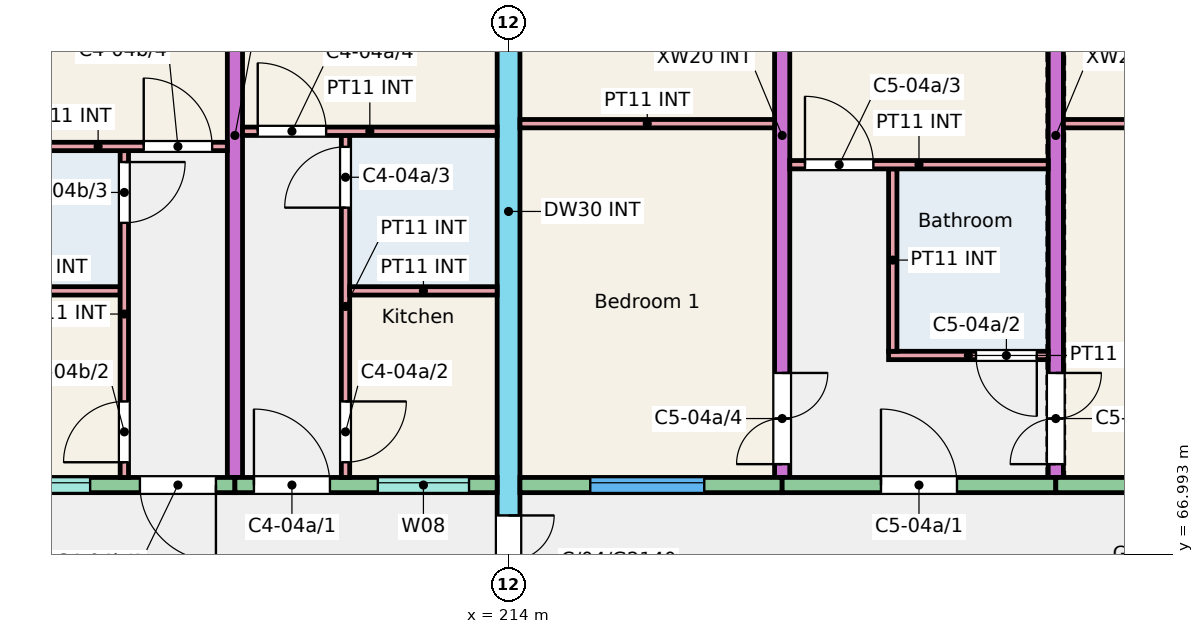
"""IFC4 building model, lengths in metres.
Left out: names, types, materials, properties, quantities, classifications, styles, units other than length and angle.
Written with IfcOpenShell. Run it as: python <this file> out.ifc"""

import sys

from ifc_helpers import new_model, si_unit, direction, frame, frame_2d, origin, place, context, subcontext, project, spatial, rectangle, extrude, element, fill, save


model = new_model("IFC4")
c1 = context("Model", 3, precision=1e-05, world=origin(), true_north=direction((0.0, 1.0)))
c2 = subcontext(c1, "Body", "Model", "MODEL_VIEW")
j1 = project(units=[si_unit("LENGTHUNIT", "METRE"), si_unit("PLANEANGLEUNIT", "RADIAN")], contexts=[c1])
p1 = place(None, origin())
s1 = spatial("IfcSite", under=j1, at=p1, CompositionType="ELEMENT")
p2 = place(p1, origin())
s2 = spatial("IfcBuilding", under=s1, at=p2, CompositionType="ELEMENT")
p3 = place(p2, frame((0.0, 0.0, 12.0)))
s3 = spatial("IfcBuildingStorey", under=s2, at=p3, CompositionType="ELEMENT", Elevation=12.0)
p4 = place(p3, frame((210.4, 68.0, 0.0), z_axis=(0.0, 0.0, 1.0), x_axis=(0.0, 1.0, 0.0)))
e1 = element("IfcWall", 1, at=p4, inside=s3, PredefinedType="SHEAR", context=c2, shape_type="SweptSolid", body=[
    extrude(rectangle(XDim=9.0, YDim=0.2, at=frame_2d((4.5, 0.0))), origin(), (0.0, 0.0, 1.0), 3.0),
])
p5 = place(p3, frame((214.0, 66.0, 0.0), z_axis=(0.0, 0.0, 1.0), x_axis=(0.0, 1.0, 0.0)))
e2 = element("IfcWall", 2, at=p5, inside=s3, PredefinedType="SHEAR", context=c2, shape_type="SweptSolid", body=[
    extrude(rectangle(XDim=11.0, YDim=0.3, at=frame_2d((5.5, 0.0))), origin(), (0.0, 0.0, 1.0), 3.0),
])
p6 = place(p5, frame((0.3, 0.0, 0.0)))
e3 = element("IfcOpeningElement", 3, at=p6, cuts=e2, PredefinedType="OPENING", context=c2, shape_type="SweptSolid", body=[
    extrude(rectangle(XDim=1.2, YDim=2.1, at=frame_2d((0.6, 1.05))), frame((0.0, 0.16, 0.0), z_axis=(0.0, -1.0, 0.0), x_axis=(1.0, 0.0, 0.0)), (0.0, 0.0, 1.0), 0.32),
])
p7 = place(p3, frame((217.6, 68.0, 0.0), z_axis=(0.0, 0.0, 1.0), x_axis=(0.0, 1.0, 0.0)))
e4 = element("IfcWall", 4, at=p7, inside=s3, PredefinedType="SHEAR", context=c2, shape_type="SweptSolid", body=[
    extrude(rectangle(XDim=9.0, YDim=0.2, at=frame_2d((4.5, 0.0))), origin(), (0.0, 0.0, 1.0), 3.0),
])
p8 = place(p7, frame((0.175, 0.0, 0.0)))
e5 = element("IfcOpeningElement", 5, at=p8, cuts=e4, PredefinedType="OPENING", context=c2, shape_type="SweptSolid", body=[
    extrude(rectangle(XDim=1.2, YDim=2.1, at=frame_2d((0.6, 1.05))), frame((0.0, 0.11, 0.0), z_axis=(0.0, -1.0, 0.0), x_axis=(1.0, 0.0, 0.0)), (0.0, 0.0, 1.0), 0.22),
])
p9 = place(p7, frame((6.4, 0.0, 0.0)))
e6 = element("IfcOpeningElement", 6, at=p9, cuts=e4, PredefinedType="OPENING", context=c2, shape_type="SweptSolid", body=[
    extrude(rectangle(XDim=1.2, YDim=2.1, at=frame_2d((0.6, 1.05))), frame((0.0, 0.11, 0.0), z_axis=(0.0, -1.0, 0.0), x_axis=(1.0, 0.0, 0.0)), (0.0, 0.0, 1.0), 0.22),
])
p10 = place(p3, frame((221.2, 68.0, 0.0), z_axis=(0.0, 0.0, 1.0), x_axis=(0.0, 1.0, 0.0)))
e7 = element("IfcWall", 7, at=p10, inside=s3, PredefinedType="SHEAR", context=c2, shape_type="SweptSolid", body=[
    extrude(rectangle(XDim=9.0, YDim=0.2, at=frame_2d((4.5, 0.0))), origin(), (0.0, 0.0, 1.0), 3.0),
])
p11 = place(p10, frame((0.175, 0.0, 0.0)))
e8 = element("IfcOpeningElement", 8, at=p11, cuts=e7, PredefinedType="OPENING", context=c2, shape_type="SweptSolid", body=[
    extrude(rectangle(XDim=1.2, YDim=2.1, at=frame_2d((0.6, 1.05))), frame((0.0, 0.11, 0.0), z_axis=(0.0, -1.0, 0.0), x_axis=(1.0, 0.0, 0.0)), (0.0, 0.0, 1.0), 0.22),
])
p12 = place(p10, frame((6.4, 0.0, 0.0)))
e9 = element("IfcOpeningElement", 9, at=p12, cuts=e7, PredefinedType="OPENING", context=c2, shape_type="SweptSolid", body=[
    extrude(rectangle(XDim=1.2, YDim=2.1, at=frame_2d((0.6, 1.05))), frame((0.0, 0.11, 0.0), z_axis=(0.0, -1.0, 0.0), x_axis=(1.0, 0.0, 0.0)), (0.0, 0.0, 1.0), 0.22),
])
p13 = place(p3, frame((206.8, 67.9, 0.0), z_axis=(0.0, 0.0, 1.0), x_axis=(1.0, 0.0, 0.0)))
e10 = element("IfcWall", 10, at=p13, inside=s3, PredefinedType="SOLIDWALL", context=c2, shape_type="SweptSolid", body=[
    extrude(rectangle(XDim=3.6, YDim=0.2, at=frame_2d((1.8, 0.0))), origin(), (0.0, 0.0, 1.0), 3.0),
])
p14 = place(p13, frame((0.495, 0.0, 1.1)))
e11 = element("IfcOpeningElement", 11, at=p14, cuts=e10, PredefinedType="OPENING", context=c2, shape_type="SweptSolid", body=[
    extrude(rectangle(XDim=1.2, YDim=1.3, at=frame_2d((0.6, 0.65))), frame((0.0, 0.11, 0.0), z_axis=(0.0, -1.0, 0.0), x_axis=(1.0, 0.0, 0.0)), (0.0, 0.0, 1.0), 0.22),
])
p15 = place(p13, frame((2.35, 0.0, 0.0)))
e12 = element("IfcOpeningElement", 12, at=p15, cuts=e10, PredefinedType="OPENING", context=c2, shape_type="SweptSolid", body=[
    extrude(rectangle(XDim=1.0, YDim=2.1, at=frame_2d((0.5, 1.05))), frame((0.0, 0.11, 0.0), z_axis=(0.0, -1.0, 0.0), x_axis=(1.0, 0.0, 0.0)), (0.0, 0.0, 1.0), 0.22),
])
p16 = place(p3, frame((210.4, 67.9, 0.0), z_axis=(0.0, 0.0, 1.0), x_axis=(1.0, 0.0, 0.0)))
e13 = element("IfcWall", 13, at=p16, inside=s3, PredefinedType="SOLIDWALL", context=c2, shape_type="SweptSolid", body=[
    extrude(rectangle(XDim=3.45, YDim=0.2, at=frame_2d((1.725, 0.0))), origin(), (0.0, 0.0, 1.0), 3.0),
])
p17 = place(p16, frame((1.88, 0.0, 1.1)))
e14 = element("IfcOpeningElement", 14, at=p17, cuts=e13, PredefinedType="OPENING", context=c2, shape_type="SweptSolid", body=[
    extrude(rectangle(XDim=1.2, YDim=1.3, at=frame_2d((0.6, 0.65))), frame((0.0, 0.11, 0.0), z_axis=(0.0, -1.0, 0.0), x_axis=(1.0, 0.0, 0.0)), (0.0, 0.0, 1.0), 0.22),
])
p18 = place(p16, frame((0.25, 0.0, 0.0)))
e15 = element("IfcOpeningElement", 15, at=p18, cuts=e13, PredefinedType="OPENING", context=c2, shape_type="SweptSolid", body=[
    extrude(rectangle(XDim=1.0, YDim=2.1, at=frame_2d((0.5, 1.05))), frame((0.0, 0.11, 0.0), z_axis=(0.0, -1.0, 0.0), x_axis=(1.0, 0.0, 0.0)), (0.0, 0.0, 1.0), 0.22),
])
p19 = place(p3, frame((214.15, 67.9, 0.0), z_axis=(0.0, 0.0, 1.0), x_axis=(1.0, 0.0, 0.0)))
e16 = element("IfcWall", 16, at=p19, inside=s3, PredefinedType="SOLIDWALL", context=c2, shape_type="SweptSolid", body=[
    extrude(rectangle(XDim=3.45, YDim=0.2, at=frame_2d((1.725, 0.0))), origin(), (0.0, 0.0, 1.0), 3.0),
])
p20 = place(p19, frame((0.925, 0.0, 0.9)))
e17 = element("IfcOpeningElement", 17, at=p20, cuts=e16, PredefinedType="OPENING", context=c2, shape_type="SweptSolid", body=[
    extrude(rectangle(XDim=1.5, YDim=1.5, at=frame_2d((0.75, 0.75))), frame((0.0, 0.11, 0.0), z_axis=(0.0, -1.0, 0.0), x_axis=(1.0, 0.0, 0.0)), (0.0, 0.0, 1.0), 0.22),
])
p21 = place(p3, frame((217.6, 67.9, 0.0), z_axis=(0.0, 0.0, 1.0), x_axis=(1.0, 0.0, 0.0)))
e18 = element("IfcWall", 18, at=p21, inside=s3, PredefinedType="SOLIDWALL", context=c2, shape_type="SweptSolid", body=[
    extrude(rectangle(XDim=3.6, YDim=0.2, at=frame_2d((1.8, 0.0))), origin(), (0.0, 0.0, 1.0), 3.0),
])
p22 = place(p21, frame((1.3, 0.0, 0.0)))
e19 = element("IfcOpeningElement", 19, at=p22, cuts=e18, PredefinedType="OPENING", context=c2, shape_type="SweptSolid", body=[
    extrude(rectangle(XDim=1.0, YDim=2.1, at=frame_2d((0.5, 1.05))), frame((0.0, 0.11, 0.0), z_axis=(0.0, -1.0, 0.0), x_axis=(1.0, 0.0, 0.0)), (0.0, 0.0, 1.0), 0.22),
])
p23 = place(p3, frame((221.2, 67.9, 0.0), z_axis=(0.0, 0.0, 1.0), x_axis=(1.0, 0.0, 0.0)))
e20 = element("IfcWall", 20, at=p23, inside=s3, PredefinedType="SOLIDWALL", context=c2, shape_type="SweptSolid", body=[
    extrude(rectangle(XDim=3.6, YDim=0.2, at=frame_2d((1.8, 0.0))), origin(), (0.0, 0.0, 1.0), 3.0),
])
p24 = place(p23, frame((1.038, 0.0, 0.9)))
e21 = element("IfcOpeningElement", 21, at=p24, cuts=e20, PredefinedType="OPENING", context=c2, shape_type="SweptSolid", body=[
    extrude(rectangle(XDim=1.5, YDim=1.5, at=frame_2d((0.75, 0.75))), frame((0.0, 0.11, 0.0), z_axis=(0.0, -1.0, 0.0), x_axis=(1.0, 0.0, 0.0)), (0.0, 0.0, 1.0), 0.22),
])
p25 = place(p3, frame((211.855, 68.0, 0.0), z_axis=(0.0, 0.0, 1.0), x_axis=(0.0, 1.0, 0.0)))
e22 = element("IfcWall", 22, at=p25, inside=s3, PredefinedType="PARTITIONING", context=c2, shape_type="SweptSolid", body=[
    extrude(rectangle(XDim=4.5, YDim=0.11, at=frame_2d((2.25, 0.0))), origin(), (0.0, 0.0, 1.0), 2.8),
])
p26 = place(p25, frame((0.2, 0.0, 0.0)))
e23 = element("IfcOpeningElement", 23, at=p26, cuts=e22, PredefinedType="OPENING", context=c2, shape_type="SweptSolid", body=[
    extrude(rectangle(XDim=0.8, YDim=2.1, at=frame_2d((0.4, 1.05))), frame((0.0, 0.065, 0.0), z_axis=(0.0, -1.0, 0.0), x_axis=(1.0, 0.0, 0.0)), (0.0, 0.0, 1.0), 0.13),
])
p27 = place(p25, frame((3.55, 0.0, 0.0)))
e24 = element("IfcOpeningElement", 24, at=p27, cuts=e22, PredefinedType="OPENING", context=c2, shape_type="SweptSolid", body=[
    extrude(rectangle(XDim=0.8, YDim=2.1, at=frame_2d((0.4, 1.05))), frame((0.0, 0.065, 0.0), z_axis=(0.0, -1.0, 0.0), x_axis=(1.0, 0.0, 0.0)), (0.0, 0.0, 1.0), 0.13),
])
p28 = place(p3, frame((211.91, 70.455, 0.0), z_axis=(0.0, 0.0, 1.0), x_axis=(1.0, 0.0, 0.0)))
e25 = element("IfcWall", 25, at=p28, inside=s3, PredefinedType="PARTITIONING", context=c2, shape_type="SweptSolid", body=[
    extrude(rectangle(XDim=1.94, YDim=0.11, at=frame_2d((0.97, 0.0))), origin(), (0.0, 0.0, 1.0), 2.8),
])
p29 = place(p3, frame((210.5, 72.555, 0.0), z_axis=(0.0, 0.0, 1.0), x_axis=(1.0, 0.0, 0.0)))
e26 = element("IfcWall", 26, at=p29, inside=s3, PredefinedType="PARTITIONING", context=c2, shape_type="SweptSolid", body=[
    extrude(rectangle(XDim=3.35, YDim=0.11, at=frame_2d((1.675, 0.0))), origin(), (0.0, 0.0, 1.0), 2.8),
])
p30 = place(p29, frame((0.2, 0.0, 0.0)))
e27 = element("IfcOpeningElement", 27, at=p30, cuts=e26, PredefinedType="OPENING", context=c2, shape_type="SweptSolid", body=[
    extrude(rectangle(XDim=0.9, YDim=2.1, at=frame_2d((0.45, 1.05))), frame((0.0, 0.065, 0.0), z_axis=(0.0, -1.0, 0.0), x_axis=(1.0, 0.0, 0.0)), (0.0, 0.0, 1.0), 0.13),
])
p31 = place(p3, frame((206.9, 70.455, 0.0), z_axis=(0.0, 0.0, 1.0), x_axis=(1.0, 0.0, 0.0)))
e28 = element("IfcWall", 28, at=p31, inside=s3, PredefinedType="PARTITIONING", context=c2, shape_type="SweptSolid", body=[
    extrude(rectangle(XDim=1.99, YDim=0.11, at=frame_2d((0.995, 0.0))), origin(), (0.0, 0.0, 1.0), 2.8),
])
p32 = place(p3, frame((208.945, 68.0, 0.0), z_axis=(0.0, 0.0, 1.0), x_axis=(0.0, 1.0, 0.0)))
e29 = element("IfcWall", 29, at=p32, inside=s3, PredefinedType="PARTITIONING", context=c2, shape_type="SweptSolid", body=[
    extrude(rectangle(XDim=4.3, YDim=0.11, at=frame_2d((2.15, 0.0))), origin(), (0.0, 0.0, 1.0), 2.8),
])
p33 = place(p32, frame((0.2, 0.0, 0.0)))
e30 = element("IfcOpeningElement", 30, at=p33, cuts=e29, PredefinedType="OPENING", context=c2, shape_type="SweptSolid", body=[
    extrude(rectangle(XDim=0.8, YDim=2.1, at=frame_2d((0.4, 1.05))), frame((0.0, 0.065, 0.0), z_axis=(0.0, -1.0, 0.0), x_axis=(1.0, 0.0, 0.0)), (0.0, 0.0, 1.0), 0.13),
])
p34 = place(p32, frame((3.35, 0.0, 0.0)))
e31 = element("IfcOpeningElement", 31, at=p34, cuts=e29, PredefinedType="OPENING", context=c2, shape_type="SweptSolid", body=[
    extrude(rectangle(XDim=0.8, YDim=2.1, at=frame_2d((0.4, 1.05))), frame((0.0, 0.065, 0.0), z_axis=(0.0, -1.0, 0.0), x_axis=(1.0, 0.0, 0.0)), (0.0, 0.0, 1.0), 0.13),
])
p35 = place(p3, frame((206.9, 72.355, 0.0), z_axis=(0.0, 0.0, 1.0), x_axis=(1.0, 0.0, 0.0)))
e32 = element("IfcWall", 32, at=p35, inside=s3, PredefinedType="PARTITIONING", context=c2, shape_type="SweptSolid", body=[
    extrude(rectangle(XDim=3.4, YDim=0.11, at=frame_2d((1.7, 0.0))), origin(), (0.0, 0.0, 1.0), 2.8),
])
p36 = place(p35, frame((2.3, 0.0, 0.0)))
e33 = element("IfcOpeningElement", 33, at=p36, cuts=e32, PredefinedType="OPENING", context=c2, shape_type="SweptSolid", body=[
    extrude(rectangle(XDim=0.9, YDim=2.1, at=frame_2d((0.45, 1.05))), frame((0.0, 0.065, 0.0), z_axis=(0.0, -1.0, 0.0), x_axis=(1.0, 0.0, 0.0)), (0.0, 0.0, 1.0), 0.13),
])
p37 = place(p3, frame((219.0, 69.605, 0.0), z_axis=(0.0, 0.0, 1.0), x_axis=(1.0, 0.0, 0.0)))
e34 = element("IfcWall", 34, at=p37, inside=s3, PredefinedType="PARTITIONING", context=c2, shape_type="SweptSolid", body=[
    extrude(rectangle(XDim=2.1, YDim=0.11, at=frame_2d((1.05, 0.0))), origin(), (0.0, 0.0, 1.0), 2.8),
])
p38 = place(p37, frame((1.15, 0.0, 0.0)))
e35 = element("IfcOpeningElement", 35, at=p38, cuts=e34, PredefinedType="OPENING", context=c2, shape_type="SweptSolid", body=[
    extrude(rectangle(XDim=0.8, YDim=2.1, at=frame_2d((0.4, 1.05))), frame((0.0, 0.065, 0.0), z_axis=(0.0, -1.0, 0.0), x_axis=(1.0, 0.0, 0.0)), (0.0, 0.0, 1.0), 0.13),
])
p39 = place(p3, frame((219.055, 69.66, 0.0), z_axis=(0.0, 0.0, 1.0), x_axis=(0.0, 1.0, 0.0)))
e36 = element("IfcWall", 36, at=p39, inside=s3, PredefinedType="PARTITIONING", context=c2, shape_type="SweptSolid", body=[
    extrude(rectangle(XDim=2.4, YDim=0.11, at=frame_2d((1.2, 0.0))), origin(), (0.0, 0.0, 1.0), 2.8),
])
p40 = place(p3, frame((217.7, 72.115, 0.0), z_axis=(0.0, 0.0, 1.0), x_axis=(1.0, 0.0, 0.0)))
e37 = element("IfcWall", 37, at=p40, inside=s3, PredefinedType="PARTITIONING", context=c2, shape_type="SweptSolid", body=[
    extrude(rectangle(XDim=3.4, YDim=0.11, at=frame_2d((1.7, 0.0))), origin(), (0.0, 0.0, 1.0), 2.8),
])
p41 = place(p40, frame((0.2, 0.0, 0.0)))
e38 = element("IfcOpeningElement", 38, at=p41, cuts=e37, PredefinedType="OPENING", context=c2, shape_type="SweptSolid", body=[
    extrude(rectangle(XDim=0.9, YDim=2.1, at=frame_2d((0.45, 1.05))), frame((0.0, 0.065, 0.0), z_axis=(0.0, -1.0, 0.0), x_axis=(1.0, 0.0, 0.0)), (0.0, 0.0, 1.0), 0.13),
])
p42 = place(p3, frame((214.15, 72.655, 0.0), z_axis=(0.0, 0.0, 1.0), x_axis=(1.0, 0.0, 0.0)))
e39 = element("IfcWall", 39, at=p42, inside=s3, PredefinedType="PARTITIONING", context=c2, shape_type="SweptSolid", body=[
    extrude(rectangle(XDim=3.35, YDim=0.11, at=frame_2d((1.675, 0.0))), origin(), (0.0, 0.0, 1.0), 2.8),
])
p43 = place(p3, frame((221.3, 72.655, 0.0), z_axis=(0.0, 0.0, 1.0), x_axis=(1.0, 0.0, 0.0)))
e40 = element("IfcWall", 40, at=p43, inside=s3, PredefinedType="PARTITIONING", context=c2, shape_type="SweptSolid", body=[
    extrude(rectangle(XDim=3.375, YDim=0.11, at=frame_2d((1.688, 0.0))), origin(), (0.0, 0.0, 1.0), 2.8),
])
p44 = place(p17, origin())
e41 = element("IfcWindow", 41, at=p44, inside=s3, PartitioningType="SINGLE_PANEL", PredefinedType="WINDOW", context=c2, shape_type="SweptSolid", body=[
    extrude(rectangle(XDim=1.2, YDim=1.3, at=frame_2d((0.6, 0.65))), frame((0.0, 0.06, 0.0), z_axis=(0.0, -1.0, 0.0), x_axis=(1.0, 0.0, 0.0)), (0.0, 0.0, 1.0), 0.06),
])
fill(e14, e41)
p45 = place(p14, origin())
e42 = element("IfcWindow", 42, at=p45, inside=s3, PartitioningType="SINGLE_PANEL", PredefinedType="WINDOW", context=c2, shape_type="SweptSolid", body=[
    extrude(rectangle(XDim=1.2, YDim=1.3, at=frame_2d((0.6, 0.65))), frame((0.0, 0.06, 0.0), z_axis=(0.0, -1.0, 0.0), x_axis=(1.0, 0.0, 0.0)), (0.0, 0.0, 1.0), 0.06),
])
fill(e11, e42)
p46 = place(p20, origin())
e43 = element("IfcWindow", 43, at=p46, inside=s3, PartitioningType="SINGLE_PANEL", PredefinedType="WINDOW", context=c2, shape_type="SweptSolid", body=[
    extrude(rectangle(XDim=1.5, YDim=1.5, at=frame_2d((0.75, 0.75))), frame((0.0, 0.06, 0.0), z_axis=(0.0, -1.0, 0.0), x_axis=(1.0, 0.0, 0.0)), (0.0, 0.0, 1.0), 0.06),
])
fill(e17, e43)
p47 = place(p18, origin())
e44 = element("IfcDoor", 44, at=p47, inside=s3, OperationType="SINGLE_SWING_LEFT", PredefinedType="DOOR", context=c2, shape_type="SweptSolid", body=[
    extrude(rectangle(XDim=1.0, YDim=2.1, at=frame_2d((0.5, 1.05))), frame((0.0, 0.025, 0.0), z_axis=(0.0, -1.0, 0.0), x_axis=(1.0, 0.0, 0.0)), (0.0, 0.0, 1.0), 0.05),
])
fill(e15, e44)
p48 = place(p26, origin())
e45 = element("IfcDoor", 45, at=p48, inside=s3, OperationType="SINGLE_SWING_RIGHT", PredefinedType="DOOR", context=c2, shape_type="SweptSolid", body=[
    extrude(rectangle(XDim=0.8, YDim=2.1, at=frame_2d((0.4, 1.05))), frame((0.0, 0.025, 0.0), z_axis=(0.0, -1.0, 0.0), x_axis=(1.0, 0.0, 0.0)), (0.0, 0.0, 1.0), 0.05),
])
fill(e23, e45)
p49 = place(p27, origin())
e46 = element("IfcDoor", 46, at=p49, inside=s3, OperationType="SINGLE_SWING_LEFT", PredefinedType="DOOR", context=c2, shape_type="SweptSolid", body=[
    extrude(rectangle(XDim=0.8, YDim=2.1, at=frame_2d((0.4, 1.05))), frame((0.0, 0.025, 0.0), z_axis=(0.0, -1.0, 0.0), x_axis=(1.0, 0.0, 0.0)), (0.0, 0.0, 1.0), 0.05),
])
fill(e24, e46)
p50 = place(p30, origin())
e47 = element("IfcDoor", 47, at=p50, inside=s3, OperationType="SINGLE_SWING_LEFT", PredefinedType="DOOR", context=c2, shape_type="SweptSolid", body=[
    extrude(rectangle(XDim=0.9, YDim=2.1, at=frame_2d((0.45, 1.05))), frame((0.0, 0.025, 0.0), z_axis=(0.0, -1.0, 0.0), x_axis=(1.0, 0.0, 0.0)), (0.0, 0.0, 1.0), 0.05),
])
fill(e27, e47)
p51 = place(p15, origin())
e48 = element("IfcDoor", 48, at=p51, inside=s3, OperationType="SINGLE_SWING_RIGHT", PredefinedType="DOOR", context=c2, shape_type="SweptSolid", body=[
    extrude(rectangle(XDim=1.0, YDim=2.1, at=frame_2d((0.5, 1.05))), frame((0.0, 0.025, 0.0), z_axis=(0.0, -1.0, 0.0), x_axis=(1.0, 0.0, 0.0)), (0.0, 0.0, 1.0), 0.05),
])
fill(e12, e48)
p52 = place(p33, origin())
e49 = element("IfcDoor", 49, at=p52, inside=s3, OperationType="SINGLE_SWING_LEFT", PredefinedType="DOOR", context=c2, shape_type="SweptSolid", body=[
    extrude(rectangle(XDim=0.8, YDim=2.1, at=frame_2d((0.4, 1.05))), frame((0.0, 0.025, 0.0), z_axis=(0.0, -1.0, 0.0), x_axis=(1.0, 0.0, 0.0)), (0.0, 0.0, 1.0), 0.05),
])
fill(e30, e49)
p53 = place(p34, origin())
e50 = element("IfcDoor", 50, at=p53, inside=s3, OperationType="SINGLE_SWING_RIGHT", PredefinedType="DOOR", context=c2, shape_type="SweptSolid", body=[
    extrude(rectangle(XDim=0.8, YDim=2.1, at=frame_2d((0.4, 1.05))), frame((0.0, 0.025, 0.0), z_axis=(0.0, -1.0, 0.0), x_axis=(1.0, 0.0, 0.0)), (0.0, 0.0, 1.0), 0.05),
])
fill(e31, e50)
p54 = place(p36, origin())
e51 = element("IfcDoor", 51, at=p54, inside=s3, OperationType="SINGLE_SWING_LEFT", PredefinedType="DOOR", context=c2, shape_type="SweptSolid", body=[
    extrude(rectangle(XDim=0.9, YDim=2.1, at=frame_2d((0.45, 1.05))), frame((0.0, 0.025, 0.0), z_axis=(0.0, -1.0, 0.0), x_axis=(1.0, 0.0, 0.0)), (0.0, 0.0, 1.0), 0.05),
])
fill(e33, e51)
p55 = place(p22, origin())
e52 = element("IfcDoor", 52, at=p55, inside=s3, OperationType="SINGLE_SWING_LEFT", PredefinedType="DOOR", context=c2, shape_type="SweptSolid", body=[
    extrude(rectangle(XDim=1.0, YDim=2.1, at=frame_2d((0.5, 1.05))), frame((0.0, 0.025, 0.0), z_axis=(0.0, -1.0, 0.0), x_axis=(1.0, 0.0, 0.0)), (0.0, 0.0, 1.0), 0.05),
])
fill(e19, e52)
p56 = place(p38, origin())
e53 = element("IfcDoor", 53, at=p56, inside=s3, OperationType="SINGLE_SWING_RIGHT", PredefinedType="DOOR", context=c2, shape_type="SweptSolid", body=[
    extrude(rectangle(XDim=0.8, YDim=2.1, at=frame_2d((0.4, 1.05))), frame((0.0, 0.025, 0.0), z_axis=(0.0, -1.0, 0.0), x_axis=(1.0, 0.0, 0.0)), (0.0, 0.0, 1.0), 0.05),
])
fill(e35, e53)
p57 = place(p41, origin())
e54 = element("IfcDoor", 54, at=p57, inside=s3, OperationType="SINGLE_SWING_LEFT", PredefinedType="DOOR", context=c2, shape_type="SweptSolid", body=[
    extrude(rectangle(XDim=0.9, YDim=2.1, at=frame_2d((0.45, 1.05))), frame((0.0, 0.025, 0.0), z_axis=(0.0, -1.0, 0.0), x_axis=(1.0, 0.0, 0.0)), (0.0, 0.0, 1.0), 0.05),
])
fill(e38, e54)
p58 = place(p8, origin())
e55 = element("IfcDoor", 55, at=p58, inside=s3, OperationType="DOUBLE_DOOR_SINGLE_SWING", PredefinedType="DOOR", context=c2, shape_type="SweptSolid", body=[
    extrude(rectangle(XDim=1.2, YDim=2.1, at=frame_2d((0.6, 1.05))), frame((0.0, 0.025, 0.0), z_axis=(0.0, -1.0, 0.0), x_axis=(1.0, 0.0, 0.0)), (0.0, 0.0, 1.0), 0.05),
])
fill(e5, e55)
p59 = place(p11, origin())
e56 = element("IfcDoor", 56, at=p59, inside=s3, OperationType="DOUBLE_DOOR_SINGLE_SWING", PredefinedType="DOOR", context=c2, shape_type="SweptSolid", body=[
    extrude(rectangle(XDim=1.2, YDim=2.1, at=frame_2d((0.6, 1.05))), frame((0.0, 0.025, 0.0), z_axis=(0.0, -1.0, 0.0), x_axis=(1.0, 0.0, 0.0)), (0.0, 0.0, 1.0), 0.05),
])
fill(e8, e56)
p60 = place(p6, origin())
e57 = element("IfcDoor", 57, at=p60, inside=s3, OperationType="DOUBLE_DOOR_SINGLE_SWING", PredefinedType="DOOR", context=c2, shape_type="SweptSolid", body=[
    extrude(rectangle(XDim=1.2, YDim=2.1, at=frame_2d((0.6, 1.05))), frame((0.0, 0.025, 0.0), z_axis=(0.0, -1.0, 0.0), x_axis=(1.0, 0.0, 0.0)), (0.0, 0.0, 1.0), 0.05),
])
fill(e3, e57)
save(model, sys.argv[1])
